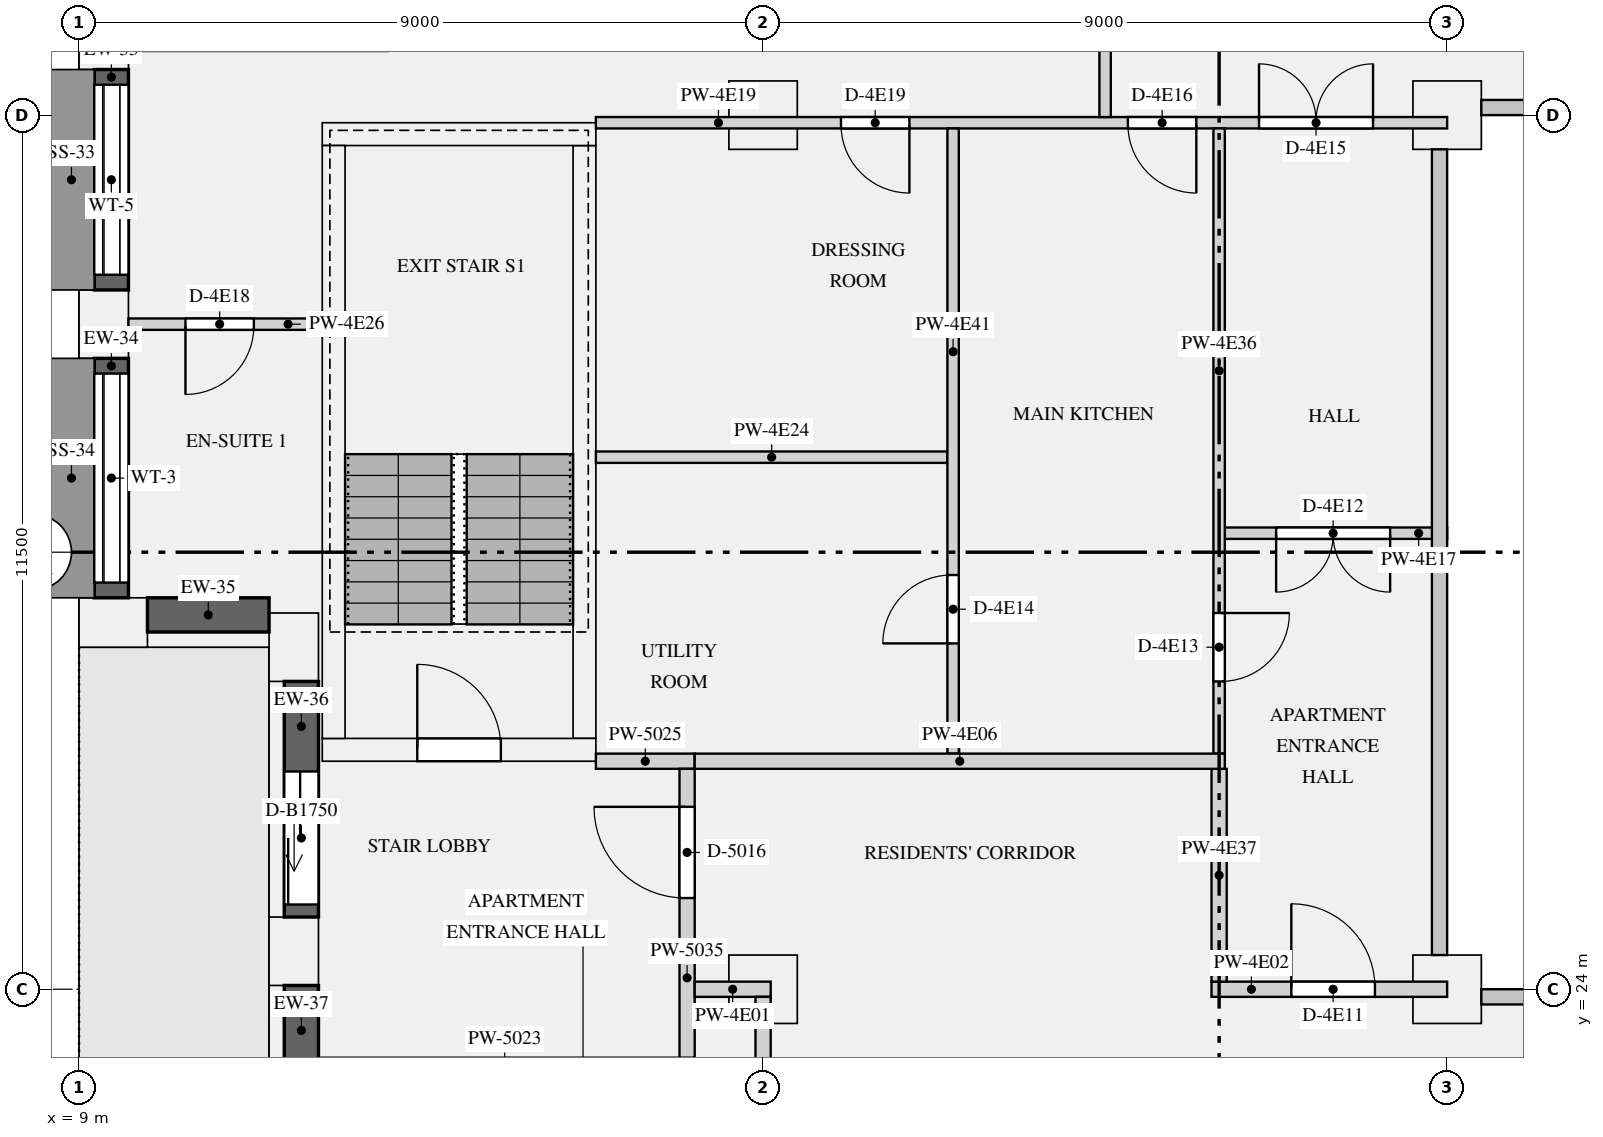
"""IFC4 building model, lengths in metres.
Left out: names, types, materials, properties, quantities, classifications, styles, units other than length and angle.
Written with IfcOpenShell. Run it as: python <this file> out.ifc"""

import sys

from ifc_helpers import new_model, si_unit, direction, frame, frame_2d, origin, origin_2d, place, context, subcontext, project, spatial, rectangle, extrude, element, fill, save


model = new_model("IFC4")
c1 = context("Model", 3, precision=1e-05, world=origin(), true_north=direction((0.0, 1.0)))
c2 = subcontext(c1, "Body", "Model", "MODEL_VIEW")
j1 = project(units=[si_unit("LENGTHUNIT", "METRE"), si_unit("PLANEANGLEUNIT", "RADIAN")], contexts=[c1])
p1 = place(None, origin())
s1 = spatial("IfcSite", under=j1, at=p1, CompositionType="ELEMENT")
p2 = place(p1, origin())
s2 = spatial("IfcBuilding", under=s1, at=p2, CompositionType="ELEMENT")
p3 = place(p2, frame((0.0, 0.0, 229.5)))
s3 = spatial("IfcBuildingStorey", under=s2, at=p3, CompositionType="ELEMENT", Elevation=229.5)
for number, where, z_axis, x_axis in (
    (1, (9.325, 36.55, 0.0), (0.0, 0.0, 1.0), (0.0, -1.0, 0.0)),
    (2, (9.325, 32.75, 0.0), (0.0, 0.0, 1.0), (0.0, -1.0, 0.0)),
    (3, (9.45, 28.825, 0.0), (0.0, 0.0, 1.0), (1.0, 0.0, 0.0)),
    (4, (11.825, 28.5, 0.0), (0.0, 0.0, 1.0), (0.0, -1.0, 0.0)),
    (5, (11.825, 24.5, 0.0), (0.0, 0.0, 1.0), (0.0, -1.0, 0.0)),
):
    element("IfcColumn", number, at=place(p3, frame(where, z_axis=z_axis, x_axis=x_axis)), inside=s3, PredefinedType="USERDEFINED", context=c2, shape_type="SweptSolid", body=[
        extrude(rectangle(XDim=0.9, YDim=0.65, at=origin_2d()), origin(), (0.0, 0.0, 1.0), 3.15),
    ])
for number, where, z_axis, x_axis in (
    (6, (18.0, 24.0, 0.0), (0.0, 0.0, 1.0), (1.0, 0.0, 0.0)),
    (7, (27.0, 24.0, 0.0), (0.0, 0.0, 1.0), (1.0, 0.0, 0.0)),
    (8, (18.0, 35.5, 0.0), (0.0, 0.0, 1.0), (1.0, 0.0, 0.0)),
    (9, (27.0, 35.5, 0.0), (0.0, 0.0, 1.0), (1.0, 0.0, 0.0)),
):
    element("IfcColumn", number, at=place(p3, frame(where, z_axis=z_axis, x_axis=x_axis)), inside=s3, PredefinedType="COLUMN", context=c2, shape_type="SweptSolid", body=[
        extrude(rectangle(XDim=0.9, YDim=0.9, at=origin_2d()), origin(), (0.0, 0.0, 1.0), 3.15),
    ])
p4 = place(p3, frame((12.2, 27.15, 0.0), z_axis=(0.0, 0.0, 1.0), x_axis=(1.0, 0.0, 0.0)))
e10 = element("IfcWall", 10, at=p4, inside=s3, PredefinedType="SHEAR", context=c2, shape_type="SweptSolid", body=[
    extrude(rectangle(XDim=3.6, YDim=0.3, at=frame_2d((1.8, 0.0))), origin(), (0.0, 0.0, 1.0), 3.15),
])
p5 = place(p4, frame((1.25, 0.0, 0.0)))
e11 = element("IfcOpeningElement", 11, at=p5, cuts=e10, PredefinedType="OPENING", context=c2, shape_type="SweptSolid", body=[
    extrude(rectangle(XDim=1.1, YDim=2.1, at=frame_2d((0.55, 1.05))), frame((0.0, 0.16, 0.0), z_axis=(0.0, -1.0, 0.0), x_axis=(1.0, 0.0, 0.0)), (0.0, 0.0, 1.0), 0.32),
])
p6 = place(p3, frame((12.2, 35.25, 0.0), z_axis=(0.0, 0.0, 1.0), x_axis=(1.0, 0.0, 0.0)))
e12 = element("IfcWall", 12, at=p6, inside=s3, PredefinedType="SHEAR", context=c2, shape_type="SweptSolid", body=[
    extrude(rectangle(XDim=3.6, YDim=0.3, at=frame_2d((1.8, 0.0))), origin(), (0.0, 0.0, 1.0), 3.15),
])
for number, where, z_axis, x_axis in (
    (13, (12.35, 27.3, 0.0), (0.0, 0.0, 1.0), (0.0, 1.0, 0.0)),
    (14, (15.65, 27.3, 0.0), (0.0, 0.0, 1.0), (0.0, 1.0, 0.0)),
):
    element("IfcWall", number, at=place(p3, frame(where, z_axis=z_axis, x_axis=x_axis)), inside=s3, PredefinedType="SHEAR", context=c2, shape_type="SweptSolid", body=[
        extrude(rectangle(XDim=7.8, YDim=0.3, at=frame_2d((3.9, 0.0))), origin(), (0.0, 0.0, 1.0), 3.15),
    ])
p7 = place(p3, frame((9.425, 36.1, 0.9), z_axis=(0.0, 0.0, 1.0), x_axis=(0.0, -1.0, 0.0)))
e15 = element("IfcWall", 15, at=p7, inside=s3, PredefinedType="SOLIDWALL", context=c2, shape_type="SweptSolid", body=[
    extrude(rectangle(XDim=2.9, YDim=0.45, at=frame_2d((1.45, 0.0))), origin(), (0.0, 0.0, 1.0), 1.93),
])
p8 = place(p7, frame((0.2, 0.0, 0.15)))
e16 = element("IfcOpeningElement", 16, at=p8, cuts=e15, PredefinedType="OPENING", context=c2, shape_type="SweptSolid", body=[
    extrude(rectangle(XDim=2.5, YDim=1.5, at=frame_2d((1.25, 0.75))), frame((0.0, 0.235, 0.0), z_axis=(0.0, -1.0, 0.0), x_axis=(1.0, 0.0, 0.0)), (0.0, 0.0, 1.0), 0.47),
])
p9 = place(p3, frame((9.425, 32.3, 0.9), z_axis=(0.0, 0.0, 1.0), x_axis=(0.0, -1.0, 0.0)))
e17 = element("IfcWall", 17, at=p9, inside=s3, PredefinedType="SOLIDWALL", context=c2, shape_type="SweptSolid", body=[
    extrude(rectangle(XDim=3.15, YDim=0.45, at=frame_2d((1.575, 0.0))), origin(), (0.0, 0.0, 1.0), 1.93),
])
p10 = place(p9, frame((0.2, 0.0, 0.15)))
e18 = element("IfcOpeningElement", 18, at=p10, cuts=e17, PredefinedType="OPENING", context=c2, shape_type="SweptSolid", body=[
    extrude(rectangle(XDim=2.75, YDim=1.5, at=frame_2d((1.375, 0.75))), frame((0.0, 0.235, 0.0), z_axis=(0.0, -1.0, 0.0), x_axis=(1.0, 0.0, 0.0)), (0.0, 0.0, 1.0), 0.47),
])
p11 = place(p3, frame((9.9, 28.925, 0.9), z_axis=(0.0, 0.0, 1.0), x_axis=(1.0, 0.0, 0.0)))
e19 = element("IfcWall", 19, at=p11, inside=s3, PredefinedType="SOLIDWALL", context=c2, shape_type="SweptSolid", body=[
    extrude(rectangle(XDim=1.6, YDim=0.45, at=frame_2d((0.8, 0.0))), origin(), (0.0, 0.0, 1.0), 1.93),
])
p12 = place(p3, frame((11.925, 28.05, 0.0), z_axis=(0.0, 0.0, 1.0), x_axis=(0.0, -1.0, 0.0)))
e20 = element("IfcWall", 20, at=p12, inside=s3, PredefinedType="SOLIDWALL", context=c2, shape_type="SweptSolid", body=[
    extrude(rectangle(XDim=3.1, YDim=0.45, at=frame_2d((1.55, 0.0))), origin(), (0.0, 0.0, 1.0), 2.83),
])
p13 = place(p12, frame((1.185, 0.0, 0.0)))
e21 = element("IfcOpeningElement", 21, at=p13, cuts=e20, PredefinedType="OPENING", context=c2, shape_type="SweptSolid", body=[
    extrude(rectangle(XDim=1.75, YDim=2.3, at=frame_2d((0.875, 1.15))), frame((0.0, 0.235, 0.0), z_axis=(0.0, -1.0, 0.0), x_axis=(1.0, 0.0, 0.0)), (0.0, 0.0, 1.0), 0.47),
])
p14 = place(p3, frame((11.925, 24.05, 0.0), z_axis=(0.0, 0.0, 1.0), x_axis=(0.0, -1.0, 0.0)))
e22 = element("IfcWall", 22, at=p14, inside=s3, PredefinedType="SOLIDWALL", context=c2, shape_type="SweptSolid", body=[
    extrude(rectangle(XDim=3.1, YDim=0.45, at=frame_2d((1.55, 0.0))), origin(), (0.0, 0.0, 1.0), 2.83),
])
p15 = place(p14, frame((1.185, 0.0, 0.0)))
e23 = element("IfcOpeningElement", 23, at=p15, cuts=e22, PredefinedType="OPENING", context=c2, shape_type="SweptSolid", body=[
    extrude(rectangle(XDim=1.75, YDim=2.3, at=frame_2d((0.875, 1.15))), frame((0.0, 0.235, 0.0), z_axis=(0.0, -1.0, 0.0), x_axis=(1.0, 0.0, 0.0)), (0.0, 0.0, 1.0), 0.47),
])
p16 = place(p3, frame((15.8, 27.0, 0.0), z_axis=(0.0, 0.0, 1.0), x_axis=(1.0, 0.0, 0.0)))
e24 = element("IfcWall", 24, at=p16, inside=s3, PredefinedType="PARTITIONING", context=c2, shape_type="SweptSolid", body=[
    extrude(rectangle(XDim=1.3, YDim=0.2, at=frame_2d((0.65, 0.0))), origin(), (0.0, 0.0, 1.0), 2.83),
])
p17 = place(p3, frame((17.0, 23.1, 0.0), z_axis=(0.0, 0.0, 1.0), x_axis=(0.0, 1.0, 0.0)))
e25 = element("IfcWall", 25, at=p17, inside=s3, PredefinedType="PARTITIONING", context=c2, shape_type="SweptSolid", body=[
    extrude(rectangle(XDim=3.8, YDim=0.2, at=frame_2d((1.9, 0.0))), origin(), (0.0, 0.0, 1.0), 2.83),
])
p18 = place(p17, frame((2.1, 0.0, 0.0)))
e26 = element("IfcOpeningElement", 26, at=p18, cuts=e25, PredefinedType="OPENING", context=c2, shape_type="SweptSolid", body=[
    extrude(rectangle(XDim=1.2, YDim=2.1, at=frame_2d((0.6, 1.05))), frame((0.0, 0.11, 0.0), z_axis=(0.0, -1.0, 0.0), x_axis=(1.0, 0.0, 0.0)), (0.0, 0.0, 1.0), 0.22),
])
p19 = place(p3, frame((17.1, 24.0, 0.0), z_axis=(0.0, 0.0, 1.0), x_axis=(1.0, 0.0, 0.0)))
e27 = element("IfcWall", 27, at=p19, inside=s3, PredefinedType="PARTITIONING", context=c2, shape_type="SweptSolid", body=[
    extrude(rectangle(XDim=1.0, YDim=0.2, at=frame_2d((0.5, 0.0))), origin(), (0.0, 0.0, 1.0), 2.83),
])
p20 = place(p3, frame((23.9, 24.0, 0.0), z_axis=(0.0, 0.0, 1.0), x_axis=(1.0, 0.0, 0.0)))
e28 = element("IfcWall", 28, at=p20, inside=s3, PredefinedType="PARTITIONING", context=c2, shape_type="SweptSolid", body=[
    extrude(rectangle(XDim=3.1, YDim=0.2, at=frame_2d((1.55, 0.0))), origin(), (0.0, 0.0, 1.0), 2.83),
])
p21 = place(p20, frame((1.05, 0.0, 0.0)))
e29 = element("IfcOpeningElement", 29, at=p21, cuts=e28, PredefinedType="OPENING", context=c2, shape_type="SweptSolid", body=[
    extrude(rectangle(XDim=1.1, YDim=2.1, at=frame_2d((0.55, 1.05))), frame((0.0, 0.11, 0.0), z_axis=(0.0, -1.0, 0.0), x_axis=(1.0, 0.0, 0.0)), (0.0, 0.0, 1.0), 0.22),
])
p22 = place(p3, frame((17.1, 27.0, 0.0), z_axis=(0.0, 0.0, 1.0), x_axis=(1.0, 0.0, 0.0)))
e30 = element("IfcWall", 30, at=p22, inside=s3, PredefinedType="PARTITIONING", context=c2, shape_type="SweptSolid", body=[
    extrude(rectangle(XDim=6.975, YDim=0.2, at=frame_2d((3.487, 0.0))), origin(), (0.0, 0.0, 1.0), 2.83),
])
p23 = place(p3, frame((24.075, 30.0, 0.0), z_axis=(0.0, 0.0, 1.0), x_axis=(1.0, 0.0, 0.0)))
e31 = element("IfcWall", 31, at=p23, inside=s3, PredefinedType="PARTITIONING", context=c2, shape_type="SweptSolid", body=[
    extrude(rectangle(XDim=2.925, YDim=0.15, at=frame_2d((1.462, 0.0))), origin(), (0.0, 0.0, 1.0), 2.83),
])
p24 = place(p23, frame((0.675, 0.0, 0.0)))
e32 = element("IfcOpeningElement", 32, at=p24, cuts=e31, PredefinedType="OPENING", context=c2, shape_type="SweptSolid", body=[
    extrude(rectangle(XDim=1.5, YDim=2.1, at=frame_2d((0.75, 1.05))), frame((0.0, 0.085, 0.0), z_axis=(0.0, -1.0, 0.0), x_axis=(1.0, 0.0, 0.0)), (0.0, 0.0, 1.0), 0.17),
])
p25 = place(p3, frame((15.8, 35.4, 0.0), z_axis=(0.0, 0.0, 1.0), x_axis=(1.0, 0.0, 0.0)))
e33 = element("IfcWall", 33, at=p25, inside=s3, PredefinedType="PARTITIONING", context=c2, shape_type="SweptSolid", body=[
    extrude(rectangle(XDim=11.2, YDim=0.15, at=frame_2d((5.6, 0.0))), origin(), (0.0, 0.0, 1.0), 2.83),
])
p26 = place(p25, frame((8.725, 0.0, 0.0)))
e34 = element("IfcOpeningElement", 34, at=p26, cuts=e33, PredefinedType="OPENING", context=c2, shape_type="SweptSolid", body=[
    extrude(rectangle(XDim=1.5, YDim=2.1, at=frame_2d((0.75, 1.05))), frame((0.0, 0.085, 0.0), z_axis=(0.0, -1.0, 0.0), x_axis=(1.0, 0.0, 0.0)), (0.0, 0.0, 1.0), 0.17),
])
p27 = place(p25, frame((7.0, 0.0, 0.0)))
e35 = element("IfcOpeningElement", 35, at=p27, cuts=e33, PredefinedType="OPENING", context=c2, shape_type="SweptSolid", body=[
    extrude(rectangle(XDim=0.9, YDim=2.1, at=frame_2d((0.45, 1.05))), frame((0.0, 0.085, 0.0), z_axis=(0.0, -1.0, 0.0), x_axis=(1.0, 0.0, 0.0)), (0.0, 0.0, 1.0), 0.17),
])
p28 = place(p25, frame((3.225, 0.0, 0.0)))
e36 = element("IfcOpeningElement", 36, at=p28, cuts=e33, PredefinedType="OPENING", context=c2, shape_type="SweptSolid", body=[
    extrude(rectangle(XDim=0.9, YDim=2.1, at=frame_2d((0.45, 1.05))), frame((0.0, 0.085, 0.0), z_axis=(0.0, -1.0, 0.0), x_axis=(1.0, 0.0, 0.0)), (0.0, 0.0, 1.0), 0.17),
])
p29 = place(p3, frame((15.8, 31.0, 0.0), z_axis=(0.0, 0.0, 1.0), x_axis=(1.0, 0.0, 0.0)))
e37 = element("IfcWall", 37, at=p29, inside=s3, PredefinedType="PARTITIONING", context=c2, shape_type="SweptSolid", body=[
    extrude(rectangle(XDim=4.625, YDim=0.15, at=frame_2d((2.312, 0.0))), origin(), (0.0, 0.0, 1.0), 2.83),
])
p30 = place(p3, frame((9.65, 32.75, 0.0), z_axis=(0.0, 0.0, 1.0), x_axis=(1.0, 0.0, 0.0)))
e38 = element("IfcWall", 38, at=p30, inside=s3, PredefinedType="PARTITIONING", context=c2, shape_type="SweptSolid", body=[
    extrude(rectangle(XDim=2.55, YDim=0.15, at=frame_2d((1.275, 0.0))), origin(), (0.0, 0.0, 1.0), 2.83),
])
p31 = place(p30, frame((0.75, 0.0, 0.0)))
e39 = element("IfcOpeningElement", 39, at=p31, cuts=e38, PredefinedType="OPENING", context=c2, shape_type="SweptSolid", body=[
    extrude(rectangle(XDim=0.9, YDim=2.1, at=frame_2d((0.45, 1.05))), frame((0.0, 0.085, 0.0), z_axis=(0.0, -1.0, 0.0), x_axis=(1.0, 0.0, 0.0)), (0.0, 0.0, 1.0), 0.17),
])
p32 = place(p3, frame((18.0, 16.1, 0.0), z_axis=(0.0, 0.0, 1.0), x_axis=(0.0, 1.0, 0.0)))
e40 = element("IfcWall", 40, at=p32, inside=s3, PredefinedType="PARTITIONING", context=c2, shape_type="SweptSolid", body=[
    extrude(rectangle(XDim=7.8, YDim=0.2, at=frame_2d((3.9, 0.0))), origin(), (0.0, 0.0, 1.0), 2.83),
])
p33 = place(p32, frame((5.35, 0.0, 0.0)))
e41 = element("IfcOpeningElement", 41, at=p33, cuts=e40, PredefinedType="OPENING", context=c2, shape_type="SweptSolid", body=[
    extrude(rectangle(XDim=1.1, YDim=2.1, at=frame_2d((0.55, 1.05))), frame((0.0, 0.11, 0.0), z_axis=(0.0, -1.0, 0.0), x_axis=(1.0, 0.0, 0.0)), (0.0, 0.0, 1.0), 0.22),
])
p34 = place(p3, frame((24.0, 27.1, 0.0), z_axis=(0.0, 0.0, 1.0), x_axis=(0.0, 1.0, 0.0)))
e42 = element("IfcWall", 42, at=p34, inside=s3, PredefinedType="PARTITIONING", context=c2, shape_type="SweptSolid", body=[
    extrude(rectangle(XDim=8.225, YDim=0.15, at=frame_2d((4.112, 0.0))), origin(), (0.0, 0.0, 1.0), 2.83),
])
p35 = place(p34, frame((0.95, 0.0, 0.0)))
e43 = element("IfcOpeningElement", 43, at=p35, cuts=e42, PredefinedType="OPENING", context=c2, shape_type="SweptSolid", body=[
    extrude(rectangle(XDim=0.9, YDim=2.1, at=frame_2d((0.45, 1.05))), frame((0.0, 0.085, 0.0), z_axis=(0.0, -1.0, 0.0), x_axis=(1.0, 0.0, 0.0)), (0.0, 0.0, 1.0), 0.17),
])
p36 = place(p3, frame((24.0, 24.1, 0.0), z_axis=(0.0, 0.0, 1.0), x_axis=(0.0, 1.0, 0.0)))
e44 = element("IfcWall", 44, at=p36, inside=s3, PredefinedType="PARTITIONING", context=c2, shape_type="SweptSolid", body=[
    extrude(rectangle(XDim=2.8, YDim=0.2, at=frame_2d((1.4, 0.0))), origin(), (0.0, 0.0, 1.0), 2.83),
])
p37 = place(p3, frame((20.5, 27.1, 0.0), z_axis=(0.0, 0.0, 1.0), x_axis=(0.0, 1.0, 0.0)))
e45 = element("IfcWall", 45, at=p37, inside=s3, PredefinedType="PARTITIONING", context=c2, shape_type="SweptSolid", body=[
    extrude(rectangle(XDim=8.225, YDim=0.15, at=frame_2d((4.112, 0.0))), origin(), (0.0, 0.0, 1.0), 2.83),
])
p38 = place(p37, frame((1.45, 0.0, 0.0)))
e46 = element("IfcOpeningElement", 46, at=p38, cuts=e45, PredefinedType="OPENING", context=c2, shape_type="SweptSolid", body=[
    extrude(rectangle(XDim=0.9, YDim=2.1, at=frame_2d((0.45, 1.05))), frame((0.0, 0.085, 0.0), z_axis=(0.0, -1.0, 0.0), x_axis=(1.0, 0.0, 0.0)), (0.0, 0.0, 1.0), 0.17),
])
p39 = place(p3, frame((22.5, 35.475, 0.0), z_axis=(0.0, 0.0, 1.0), x_axis=(0.0, 1.0, 0.0)))
e47 = element("IfcWall", 47, at=p39, inside=s3, PredefinedType="PARTITIONING", context=c2, shape_type="SweptSolid", body=[
    extrude(rectangle(XDim=5.375, YDim=0.15, at=frame_2d((2.688, 0.0))), origin(), (0.0, 0.0, 1.0), 2.83),
])
p40 = place(p39, frame((2.275, 0.0, 0.0)))
e48 = element("IfcOpeningElement", 48, at=p40, cuts=e47, PredefinedType="OPENING", context=c2, shape_type="SweptSolid", body=[
    extrude(rectangle(XDim=0.9, YDim=2.1, at=frame_2d((0.45, 1.05))), frame((0.0, 0.085, 0.0), z_axis=(0.0, -1.0, 0.0), x_axis=(1.0, 0.0, 0.0)), (0.0, 0.0, 1.0), 0.17),
])
p41 = place(p8, origin())
e49 = element("IfcWindow", 49, at=p41, inside=s3, PartitioningType="SINGLE_PANEL", PredefinedType="WINDOW", context=c2, shape_type="SweptSolid", body=[
    extrude(rectangle(XDim=2.5, YDim=1.5, at=frame_2d((1.25, 0.75))), frame((0.0, -0.065, 0.0), z_axis=(0.0, -1.0, 0.0), x_axis=(1.0, 0.0, 0.0)), (0.0, 0.0, 1.0), 0.06),
])
fill(e16, e49)
p42 = place(p10, origin())
e50 = element("IfcWindow", 50, at=p42, inside=s3, PartitioningType="SINGLE_PANEL", PredefinedType="WINDOW", context=c2, shape_type="SweptSolid", body=[
    extrude(rectangle(XDim=2.75, YDim=1.5, at=frame_2d((1.375, 0.75))), frame((0.0, -0.065, 0.0), z_axis=(0.0, -1.0, 0.0), x_axis=(1.0, 0.0, 0.0)), (0.0, 0.0, 1.0), 0.06),
])
fill(e18, e50)
p43 = place(p13, frame((1.75, -0.19, 0.0), z_axis=(0.0, 0.0, 1.0), x_axis=(-1.0, 0.0, 0.0)))
e51 = element("IfcDoor", 51, at=p43, inside=s3, OperationType="SLIDING_TO_LEFT", PredefinedType="DOOR", context=c2, shape_type="SweptSolid", body=[
    extrude(rectangle(XDim=1.75, YDim=2.3, at=frame_2d((0.875, 1.15))), frame((0.0, -0.07, 0.0), z_axis=(0.0, -1.0, 0.0), x_axis=(1.0, 0.0, 0.0)), (0.0, 0.0, 1.0), 0.05),
])
fill(e21, e51)
p44 = place(p5, origin())
e52 = element("IfcDoor", 52, at=p44, inside=s3, OperationType="SINGLE_SWING_LEFT", PredefinedType="DOOR", context=c2, shape_type="SweptSolid", body=[
    extrude(rectangle(XDim=1.1, YDim=2.1, at=frame_2d((0.55, 1.05))), frame((0.0, 0.025, 0.0), z_axis=(0.0, -1.0, 0.0), x_axis=(1.0, 0.0, 0.0)), (0.0, 0.0, 1.0), 0.05),
])
fill(e11, e52)
p45 = place(p18, origin())
e53 = element("IfcDoor", 53, at=p45, inside=s3, OperationType="SINGLE_SWING_RIGHT", PredefinedType="DOOR", context=c2, shape_type="SweptSolid", body=[
    extrude(rectangle(XDim=1.2, YDim=2.1, at=frame_2d((0.6, 1.05))), frame((0.0, 0.025, 0.0), z_axis=(0.0, -1.0, 0.0), x_axis=(1.0, 0.0, 0.0)), (0.0, 0.0, 1.0), 0.05),
])
fill(e26, e53)
p46 = place(p21, origin())
e54 = element("IfcDoor", 54, at=p46, inside=s3, OperationType="SINGLE_SWING_LEFT", PredefinedType="DOOR", context=c2, shape_type="SweptSolid", body=[
    extrude(rectangle(XDim=1.1, YDim=2.1, at=frame_2d((0.55, 1.05))), frame((0.0, 0.025, 0.0), z_axis=(0.0, -1.0, 0.0), x_axis=(1.0, 0.0, 0.0)), (0.0, 0.0, 1.0), 0.05),
])
fill(e29, e54)
p47 = place(p24, frame((1.5, 0.0, 0.0), z_axis=(0.0, 0.0, 1.0), x_axis=(-1.0, 0.0, 0.0)))
e55 = element("IfcDoor", 55, at=p47, inside=s3, OperationType="DOUBLE_DOOR_SINGLE_SWING", PredefinedType="DOOR", context=c2, shape_type="SweptSolid", body=[
    extrude(rectangle(XDim=1.5, YDim=2.1, at=frame_2d((0.75, 1.05))), frame((0.0, 0.025, 0.0), z_axis=(0.0, -1.0, 0.0), x_axis=(1.0, 0.0, 0.0)), (0.0, 0.0, 1.0), 0.05),
])
fill(e32, e55)
p48 = place(p35, frame((0.9, 0.0, 0.0), z_axis=(0.0, 0.0, 1.0), x_axis=(-1.0, 0.0, 0.0)))
e56 = element("IfcDoor", 56, at=p48, inside=s3, OperationType="SINGLE_SWING_LEFT", PredefinedType="DOOR", context=c2, shape_type="SweptSolid", body=[
    extrude(rectangle(XDim=0.9, YDim=2.1, at=frame_2d((0.45, 1.05))), frame((0.0, 0.025, 0.0), z_axis=(0.0, -1.0, 0.0), x_axis=(1.0, 0.0, 0.0)), (0.0, 0.0, 1.0), 0.05),
])
fill(e43, e56)
p49 = place(p38, origin())
e57 = element("IfcDoor", 57, at=p49, inside=s3, OperationType="SINGLE_SWING_LEFT", PredefinedType="DOOR", context=c2, shape_type="SweptSolid", body=[
    extrude(rectangle(XDim=0.9, YDim=2.1, at=frame_2d((0.45, 1.05))), frame((0.0, 0.025, 0.0), z_axis=(0.0, -1.0, 0.0), x_axis=(1.0, 0.0, 0.0)), (0.0, 0.0, 1.0), 0.05),
])
fill(e46, e57)
p50 = place(p26, origin())
e58 = element("IfcDoor", 58, at=p50, inside=s3, OperationType="DOUBLE_DOOR_SINGLE_SWING", PredefinedType="DOOR", context=c2, shape_type="SweptSolid", body=[
    extrude(rectangle(XDim=1.5, YDim=2.1, at=frame_2d((0.75, 1.05))), frame((0.0, 0.025, 0.0), z_axis=(0.0, -1.0, 0.0), x_axis=(1.0, 0.0, 0.0)), (0.0, 0.0, 1.0), 0.05),
])
fill(e34, e58)
p51 = place(p27, frame((0.9, 0.0, 0.0), z_axis=(0.0, 0.0, 1.0), x_axis=(-1.0, 0.0, 0.0)))
e59 = element("IfcDoor", 59, at=p51, inside=s3, OperationType="SINGLE_SWING_LEFT", PredefinedType="DOOR", context=c2, shape_type="SweptSolid", body=[
    extrude(rectangle(XDim=0.9, YDim=2.1, at=frame_2d((0.45, 1.05))), frame((0.0, 0.025, 0.0), z_axis=(0.0, -1.0, 0.0), x_axis=(1.0, 0.0, 0.0)), (0.0, 0.0, 1.0), 0.05),
])
fill(e35, e59)
p52 = place(p31, frame((0.9, 0.0, 0.0), z_axis=(0.0, 0.0, 1.0), x_axis=(-1.0, 0.0, 0.0)))
e60 = element("IfcDoor", 60, at=p52, inside=s3, OperationType="SINGLE_SWING_RIGHT", PredefinedType="DOOR", context=c2, shape_type="SweptSolid", body=[
    extrude(rectangle(XDim=0.9, YDim=2.1, at=frame_2d((0.45, 1.05))), frame((0.0, 0.025, 0.0), z_axis=(0.0, -1.0, 0.0), x_axis=(1.0, 0.0, 0.0)), (0.0, 0.0, 1.0), 0.05),
])
fill(e39, e60)
p53 = place(p28, frame((0.9, 0.0, 0.0), z_axis=(0.0, 0.0, 1.0), x_axis=(-1.0, 0.0, 0.0)))
e61 = element("IfcDoor", 61, at=p53, inside=s3, OperationType="SINGLE_SWING_LEFT", PredefinedType="DOOR", context=c2, shape_type="SweptSolid", body=[
    extrude(rectangle(XDim=0.9, YDim=2.1, at=frame_2d((0.45, 1.05))), frame((0.0, 0.025, 0.0), z_axis=(0.0, -1.0, 0.0), x_axis=(1.0, 0.0, 0.0)), (0.0, 0.0, 1.0), 0.05),
])
fill(e36, e61)
save(model, sys.argv[1])
